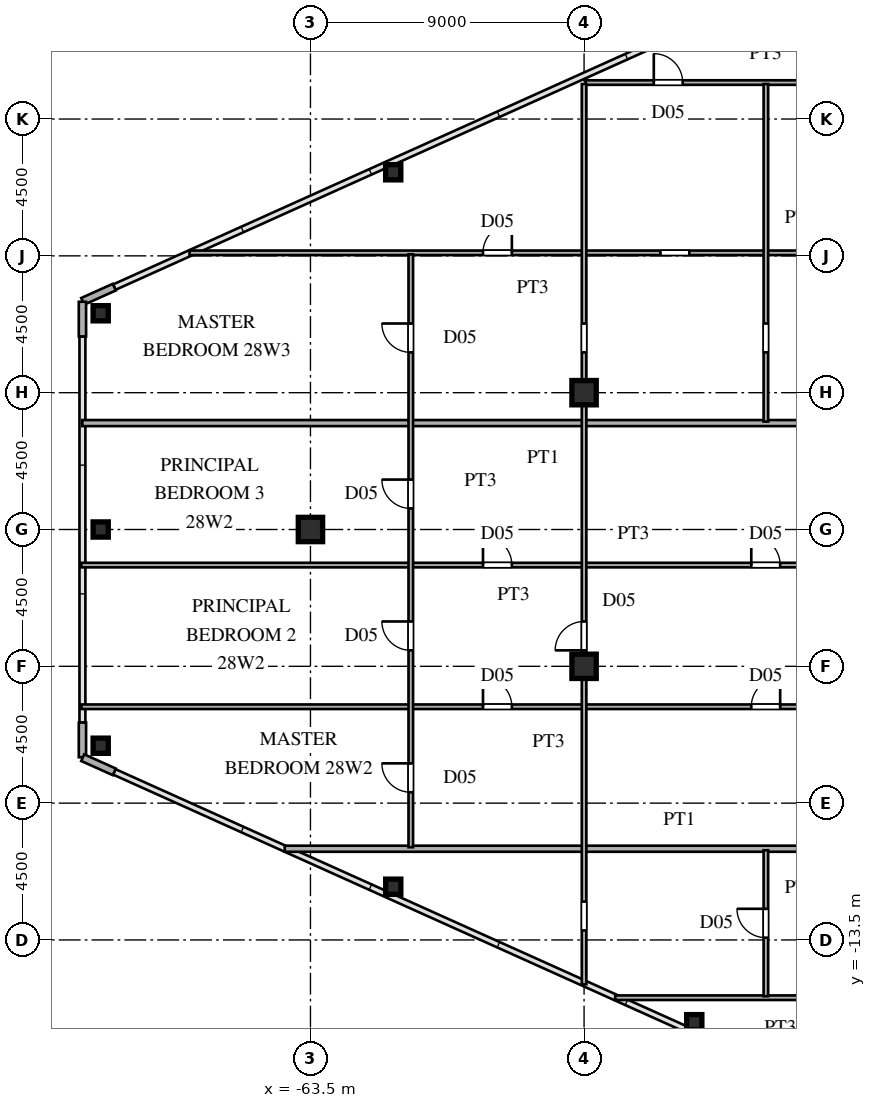
"""IFC4 building model, lengths in metres.
Left out: names, types, materials, properties, quantities, classifications, styles, units other than length and angle.
Written with IfcOpenShell. Run it as: python <this file> out.ifc"""

import sys

from ifc_helpers import new_model, si_unit, direction, frame, frame_2d, origin, origin_2d, place, context, subcontext, project, spatial, rectangle, hollow_rectangle, i_section, extrude, source, transform, mapped, element, fill, save


model = new_model("IFC4")
c1 = context("Model", 3, precision=1e-05, world=origin(), true_north=direction((0.0, 1.0)))
c2 = subcontext(c1, "Body", "Model", "MODEL_VIEW")
j1 = project(units=[si_unit("LENGTHUNIT", "METRE"), si_unit("PLANEANGLEUNIT", "RADIAN")], contexts=[c1])
p1 = place(None, origin())
s1 = spatial("IfcSite", under=j1, at=p1, CompositionType="ELEMENT")
p2 = place(p1, origin())
s2 = spatial("IfcBuilding", under=s1, at=p2, CompositionType="ELEMENT")
p3 = place(p2, frame((0.0, 0.0, 106.8)))
s3 = spatial("IfcBuildingStorey", under=s2, at=p3, CompositionType="ELEMENT", Elevation=106.8)
m1 = source(origin(), c2, "Body", "SweptSolid", [
    extrude(i_section(OverallWidth=0.8, OverallDepth=0.8, WebThickness=0.032, FlangeThickness=0.05, at=origin_2d()), origin(), (0.0, 0.0, 1.0), 3.6),
])
for number, where, z_axis, x_axis in (
    (1, (-54.5, -4.5, 0.0), (0.0, 0.0, 1.0), (1.0, 0.0, 0.0)),
    (2, (-54.5, 4.5, 0.0), (0.0, 0.0, 1.0), (1.0, 0.0, 0.0)),
    (3, (-63.5, 0.0, 0.0), (0.0, 0.0, 1.0), (1.0, 0.0, 0.0)),
):
    element("IfcColumn", number, at=place(p3, frame(where, z_axis=z_axis, x_axis=x_axis)), inside=s3, PredefinedType="COLUMN", context=c2, shape_type="MappedRepresentation", body=[
        mapped(m1, transform((0.0, 0.0, 0.0), scale=1.0)),
    ])
m2 = source(origin(), c2, "Body", "SweptSolid", [
    extrude(hollow_rectangle(XDim=0.5, YDim=0.5, WallThickness=0.02, at=origin_2d()), origin(), (0.0, 0.0, 1.0), 3.6),
])
for number, where, z_axis, x_axis in (
    (4, (-70.4, 7.112, 0.0), (0.0, 0.0, 1.0), (1.0, 0.0, 0.0)),
    (5, (-70.4, -7.112, 0.0), (0.0, 0.0, 1.0), (1.0, 0.0, 0.0)),
    (6, (-50.875, -16.205, 0.0), (0.0, 0.0, 1.0), (1.0, 0.0, 0.0)),
    (7, (-60.778, -11.749, 0.0), (0.0, 0.0, 1.0), (1.0, 0.0, 0.0)),
    (8, (-60.778, 11.749, 0.0), (0.0, 0.0, 1.0), (1.0, 0.0, 0.0)),
    (9, (-70.4, 0.0, 0.0), (0.0, 0.0, 1.0), (1.0, 0.0, 0.0)),
):
    element("IfcColumn", number, at=place(p3, frame(where, z_axis=z_axis, x_axis=x_axis)), inside=s3, PredefinedType="COLUMN", context=c2, shape_type="MappedRepresentation", body=[
        mapped(m2, transform((0.0, 0.0, 0.0), scale=1.0)),
    ])
for number, where, z_axis, x_axis in (
    (10, (-69.951, 7.972, 0.0), (0.0, 0.0, 1.0), (-0.912, -0.41, 0.0)),
    (11, (-71.0, 7.49, 0.0), (0.0, 0.0, 1.0), (0.0, -1.0, 0.0)),
    (12, (-71.0, -6.35, 0.0), (0.0, 0.0, 1.0), (0.0, -1.0, 0.0)),
    (13, (-70.991, -7.504, 0.0), (0.0, 0.0, 1.0), (0.912, -0.41, 0.0)),
):
    element("IfcWall", number, at=place(p3, frame(where, z_axis=z_axis, x_axis=x_axis)), inside=s3, PredefinedType="SOLIDWALL", context=c2, shape_type="SweptSolid", body=[
        extrude(rectangle(XDim=1.14, YDim=0.24, at=frame_2d((0.57, 0.0))), origin(), (0.0, 0.0, 1.0), 3.38),
    ])
p4 = place(p3, frame((-53.477, -15.4, 0.0), z_axis=(0.0, 0.0, 1.0), x_axis=(1.0, 0.0, 0.0)))
e14 = element("IfcWall", 14, at=p4, inside=s3, PredefinedType="PARTITIONING", context=c2, shape_type="SweptSolid", body=[
    extrude(rectangle(XDim=10.877, YDim=0.15, at=frame_2d((5.438, 0.0))), origin(), (0.0, 0.0, 1.0), 3.38),
])
p5 = place(p4, frame((7.465, 0.0, 0.0)))
e15 = element("IfcOpeningElement", 15, at=p5, cuts=e14, PredefinedType="OPENING", context=c2, shape_type="SweptSolid", body=[
    extrude(rectangle(XDim=0.95, YDim=2.15, at=frame_2d((0.475, 1.075))), frame((0.0, 0.085, 0.0), z_axis=(0.0, -1.0, 0.0), x_axis=(1.0, 0.0, 0.0)), (0.0, 0.0, 1.0), 0.17),
])
p6 = place(p3, frame((-64.346, -10.5, 0.0), z_axis=(0.0, 0.0, 1.0), x_axis=(1.0, 0.0, 0.0)))
e16 = element("IfcWall", 16, at=p6, inside=s3, PredefinedType="PARTITIONING", context=c2, shape_type="SweptSolid", body=[
    extrude(rectangle(XDim=25.966, YDim=0.2, at=frame_2d((12.983, 0.0))), origin(), (0.0, 0.0, 1.0), 3.38),
])
p7 = place(p3, frame((-71.035, -5.83, 0.0), z_axis=(0.0, 0.0, 1.0), x_axis=(1.0, 0.0, 0.0)))
e17 = element("IfcWall", 17, at=p7, inside=s3, PredefinedType="PARTITIONING", context=c2, shape_type="SweptSolid", body=[
    extrude(rectangle(XDim=28.435, YDim=0.15, at=frame_2d((14.217, 0.0))), origin(), (0.0, 0.0, 1.0), 3.38),
])
p8 = place(p7, frame((22.035, 0.0, 0.0)))
e18 = element("IfcOpeningElement", 18, at=p8, cuts=e17, PredefinedType="OPENING", context=c2, shape_type="SweptSolid", body=[
    extrude(rectangle(XDim=0.95, YDim=2.15, at=frame_2d((0.475, 1.075))), frame((0.0, 0.085, 0.0), z_axis=(0.0, -1.0, 0.0), x_axis=(1.0, 0.0, 0.0)), (0.0, 0.0, 1.0), 0.17),
])
p9 = place(p7, frame((13.21, 0.0, 0.0)))
e19 = element("IfcOpeningElement", 19, at=p9, cuts=e17, PredefinedType="OPENING", context=c2, shape_type="SweptSolid", body=[
    extrude(rectangle(XDim=0.95, YDim=2.15, at=frame_2d((0.475, 1.075))), frame((0.0, 0.085, 0.0), z_axis=(0.0, -1.0, 0.0), x_axis=(1.0, 0.0, 0.0)), (0.0, 0.0, 1.0), 0.17),
])
p10 = place(p3, frame((-71.035, -1.17, 0.0), z_axis=(0.0, 0.0, 1.0), x_axis=(1.0, 0.0, 0.0)))
e20 = element("IfcWall", 20, at=p10, inside=s3, PredefinedType="PARTITIONING", context=c2, shape_type="SweptSolid", body=[
    extrude(rectangle(XDim=28.435, YDim=0.15, at=frame_2d((14.217, 0.0))), origin(), (0.0, 0.0, 1.0), 3.38),
])
p11 = place(p10, frame((22.035, 0.0, 0.0)))
e21 = element("IfcOpeningElement", 21, at=p11, cuts=e20, PredefinedType="OPENING", context=c2, shape_type="SweptSolid", body=[
    extrude(rectangle(XDim=0.95, YDim=2.15, at=frame_2d((0.475, 1.075))), frame((0.0, 0.085, 0.0), z_axis=(0.0, -1.0, 0.0), x_axis=(1.0, 0.0, 0.0)), (0.0, 0.0, 1.0), 0.17),
])
p12 = place(p10, frame((13.21, 0.0, 0.0)))
e22 = element("IfcOpeningElement", 22, at=p12, cuts=e20, PredefinedType="OPENING", context=c2, shape_type="SweptSolid", body=[
    extrude(rectangle(XDim=0.95, YDim=2.15, at=frame_2d((0.475, 1.075))), frame((0.0, 0.085, 0.0), z_axis=(0.0, -1.0, 0.0), x_axis=(1.0, 0.0, 0.0)), (0.0, 0.0, 1.0), 0.17),
])
p13 = place(p3, frame((-71.005, 3.5, 0.0), z_axis=(0.0, 0.0, 1.0), x_axis=(1.0, 0.0, 0.0)))
e23 = element("IfcWall", 23, at=p13, inside=s3, PredefinedType="PARTITIONING", context=c2, shape_type="SweptSolid", body=[
    extrude(rectangle(XDim=32.625, YDim=0.2, at=frame_2d((16.312, 0.0))), origin(), (0.0, 0.0, 1.0), 3.38),
])
p14 = place(p3, frame((-67.478, 9.1, 0.0), z_axis=(0.0, 0.0, 1.0), x_axis=(1.0, 0.0, 0.0)))
e24 = element("IfcWall", 24, at=p14, inside=s3, PredefinedType="PARTITIONING", context=c2, shape_type="SweptSolid", body=[
    extrude(rectangle(XDim=24.878, YDim=0.15, at=frame_2d((12.439, 0.0))), origin(), (0.0, 0.0, 1.0), 3.38),
])
p15 = place(p14, frame((21.466, 0.0, 0.0)))
e25 = element("IfcOpeningElement", 25, at=p15, cuts=e24, PredefinedType="OPENING", context=c2, shape_type="SweptSolid", body=[
    extrude(rectangle(XDim=0.95, YDim=2.15, at=frame_2d((0.475, 1.075))), frame((0.0, 0.085, 0.0), z_axis=(0.0, -1.0, 0.0), x_axis=(1.0, 0.0, 0.0)), (0.0, 0.0, 1.0), 0.17),
])
p16 = place(p14, frame((9.653, 0.0, 0.0)))
e26 = element("IfcOpeningElement", 26, at=p16, cuts=e24, PredefinedType="OPENING", context=c2, shape_type="SweptSolid", body=[
    extrude(rectangle(XDim=0.95, YDim=2.15, at=frame_2d((0.475, 1.075))), frame((0.0, 0.085, 0.0), z_axis=(0.0, -1.0, 0.0), x_axis=(1.0, 0.0, 0.0)), (0.0, 0.0, 1.0), 0.17),
])
p17 = place(p14, frame((15.49, 0.0, 0.0)))
e27 = element("IfcOpeningElement", 27, at=p17, cuts=e24, PredefinedType="OPENING", context=c2, shape_type="SweptSolid", body=[
    extrude(rectangle(XDim=0.95, YDim=2.15, at=frame_2d((0.475, 1.075))), frame((0.0, 0.085, 0.0), z_axis=(0.0, -1.0, 0.0), x_axis=(1.0, 0.0, 0.0)), (0.0, 0.0, 1.0), 0.17),
])
p18 = place(p3, frame((-54.45, 14.7, 0.0), z_axis=(0.0, 0.0, 1.0), x_axis=(1.0, 0.0, 0.0)))
e28 = element("IfcWall", 28, at=p18, inside=s3, PredefinedType="PARTITIONING", context=c2, shape_type="SweptSolid", body=[
    extrude(rectangle(XDim=11.85, YDim=0.15, at=frame_2d((5.925, 0.0))), origin(), (0.0, 0.0, 1.0), 3.38),
])
p19 = place(p18, frame((2.244, 0.0, 0.0)))
e29 = element("IfcOpeningElement", 29, at=p19, cuts=e28, PredefinedType="OPENING", context=c2, shape_type="SweptSolid", body=[
    extrude(rectangle(XDim=0.95, YDim=2.15, at=frame_2d((0.475, 1.075))), frame((0.0, 0.085, 0.0), z_axis=(0.0, -1.0, 0.0), x_axis=(1.0, 0.0, 0.0)), (0.0, 0.0, 1.0), 0.17),
])
p20 = place(p3, frame((-60.2, -10.45, 0.0), z_axis=(0.0, 0.0, 1.0), x_axis=(0.0, 1.0, 0.0)))
e30 = element("IfcWall", 30, at=p20, inside=s3, PredefinedType="PARTITIONING", context=c2, shape_type="SweptSolid", body=[
    extrude(rectangle(XDim=19.501, YDim=0.15, at=frame_2d((9.75, 0.0))), origin(), (0.0, 0.0, 1.0), 3.38),
])
p21 = place(p20, frame((1.808, 0.0, 0.0)))
e31 = element("IfcOpeningElement", 31, at=p21, cuts=e30, PredefinedType="OPENING", context=c2, shape_type="SweptSolid", body=[
    extrude(rectangle(XDim=0.95, YDim=2.15, at=frame_2d((0.475, 1.075))), frame((0.0, 0.085, 0.0), z_axis=(0.0, -1.0, 0.0), x_axis=(1.0, 0.0, 0.0)), (0.0, 0.0, 1.0), 0.17),
])
p22 = place(p20, frame((6.475, 0.0, 0.0)))
e32 = element("IfcOpeningElement", 32, at=p22, cuts=e30, PredefinedType="OPENING", context=c2, shape_type="SweptSolid", body=[
    extrude(rectangle(XDim=0.95, YDim=2.15, at=frame_2d((0.475, 1.075))), frame((0.0, 0.085, 0.0), z_axis=(0.0, -1.0, 0.0), x_axis=(1.0, 0.0, 0.0)), (0.0, 0.0, 1.0), 0.17),
])
p23 = place(p20, frame((11.142, 0.0, 0.0)))
e33 = element("IfcOpeningElement", 33, at=p23, cuts=e30, PredefinedType="OPENING", context=c2, shape_type="SweptSolid", body=[
    extrude(rectangle(XDim=0.95, YDim=2.15, at=frame_2d((0.475, 1.075))), frame((0.0, 0.085, 0.0), z_axis=(0.0, -1.0, 0.0), x_axis=(1.0, 0.0, 0.0)), (0.0, 0.0, 1.0), 0.17),
])
p24 = place(p20, frame((16.275, 0.0, 0.0)))
e34 = element("IfcOpeningElement", 34, at=p24, cuts=e30, PredefinedType="OPENING", context=c2, shape_type="SweptSolid", body=[
    extrude(rectangle(XDim=0.95, YDim=2.15, at=frame_2d((0.475, 1.075))), frame((0.0, 0.085, 0.0), z_axis=(0.0, -1.0, 0.0), x_axis=(1.0, 0.0, 0.0)), (0.0, 0.0, 1.0), 0.17),
])
p25 = place(p3, frame((-54.5, -14.96, 0.0), z_axis=(0.0, 0.0, 1.0), x_axis=(0.0, 1.0, 0.0)))
e35 = element("IfcWall", 35, at=p25, inside=s3, PredefinedType="PARTITIONING", context=c2, shape_type="SweptSolid", body=[
    extrude(rectangle(XDim=29.612, YDim=0.15, at=frame_2d((14.806, 0.0))), origin(), (0.0, 0.0, 1.0), 2.78),
])
p26 = place(p25, frame((1.772, 0.0, 0.0)))
e36 = element("IfcOpeningElement", 36, at=p26, cuts=e35, PredefinedType="OPENING", context=c2, shape_type="SweptSolid", body=[
    extrude(rectangle(XDim=0.95, YDim=2.15, at=frame_2d((0.475, 1.075))), frame((0.0, 0.085, 0.0), z_axis=(0.0, -1.0, 0.0), x_axis=(1.0, 0.0, 0.0)), (0.0, 0.0, 1.0), 0.17),
])
p27 = place(p25, frame((10.985, 0.0, 0.0)))
e37 = element("IfcOpeningElement", 37, at=p27, cuts=e35, PredefinedType="OPENING", context=c2, shape_type="SweptSolid", body=[
    extrude(rectangle(XDim=0.95, YDim=2.15, at=frame_2d((0.475, 1.075))), frame((0.0, 0.085, 0.0), z_axis=(0.0, -1.0, 0.0), x_axis=(1.0, 0.0, 0.0)), (0.0, 0.0, 1.0), 0.17),
])
p28 = place(p25, frame((20.785, 0.0, 0.0)))
e38 = element("IfcOpeningElement", 38, at=p28, cuts=e35, PredefinedType="OPENING", context=c2, shape_type="SweptSolid", body=[
    extrude(rectangle(XDim=0.95, YDim=2.15, at=frame_2d((0.475, 1.075))), frame((0.0, 0.085, 0.0), z_axis=(0.0, -1.0, 0.0), x_axis=(1.0, 0.0, 0.0)), (0.0, 0.0, 1.0), 0.17),
])
p29 = place(p3, frame((-48.52, -15.351, 0.0), z_axis=(0.0, 0.0, 1.0), x_axis=(0.0, 1.0, 0.0)))
e39 = element("IfcWall", 39, at=p29, inside=s3, PredefinedType="PARTITIONING", context=c2, shape_type="SweptSolid", body=[
    extrude(rectangle(XDim=4.801, YDim=0.15, at=frame_2d((2.4, 0.0))), origin(), (0.0, 0.0, 1.0), 3.38),
])
p30 = place(p29, frame((1.925, 0.0, 0.0)))
e40 = element("IfcOpeningElement", 40, at=p30, cuts=e39, PredefinedType="OPENING", context=c2, shape_type="SweptSolid", body=[
    extrude(rectangle(XDim=0.95, YDim=2.15, at=frame_2d((0.475, 1.075))), frame((0.0, 0.085, 0.0), z_axis=(0.0, -1.0, 0.0), x_axis=(1.0, 0.0, 0.0)), (0.0, 0.0, 1.0), 0.17),
])
p31 = place(p3, frame((-48.52, 3.55, 0.0), z_axis=(0.0, 0.0, 1.0), x_axis=(0.0, 1.0, 0.0)))
e41 = element("IfcWall", 41, at=p31, inside=s3, PredefinedType="PARTITIONING", context=c2, shape_type="SweptSolid", body=[
    extrude(rectangle(XDim=11.102, YDim=0.15, at=frame_2d((5.551, 0.0))), origin(), (0.0, 0.0, 1.0), 3.38),
])
p32 = place(p31, frame((2.275, 0.0, 0.0)))
e42 = element("IfcOpeningElement", 42, at=p32, cuts=e41, PredefinedType="OPENING", context=c2, shape_type="SweptSolid", body=[
    extrude(rectangle(XDim=0.95, YDim=2.15, at=frame_2d((0.475, 1.075))), frame((0.0, 0.085, 0.0), z_axis=(0.0, -1.0, 0.0), x_axis=(1.0, 0.0, 0.0)), (0.0, 0.0, 1.0), 0.17),
])
m3 = source(origin(), c2, "Body", "SweptSolid", [
    extrude(rectangle(XDim=0.95, YDim=2.15, at=frame_2d((0.475, 1.075))), frame((0.0, 0.025, 0.0), z_axis=(0.0, -1.0, 0.0), x_axis=(1.0, 0.0, 0.0)), (0.0, 0.0, 1.0), 0.05),
])
p33 = place(p8, origin())
e43 = element("IfcDoor", 43, at=p33, inside=s3, OperationType="SINGLE_SWING_RIGHT", PredefinedType="DOOR", context=c2, shape_type="MappedRepresentation", body=[
    mapped(m3, transform((0.0, 0.0, 0.0), scale=1.0)),
])
fill(e18, e43)
p34 = place(p9, origin())
e44 = element("IfcDoor", 44, at=p34, inside=s3, OperationType="SINGLE_SWING_LEFT", PredefinedType="DOOR", context=c2, shape_type="MappedRepresentation", body=[
    mapped(m3, transform((0.0, 0.0, 0.0), scale=1.0)),
])
fill(e19, e44)
p35 = place(p11, origin())
e45 = element("IfcDoor", 45, at=p35, inside=s3, OperationType="SINGLE_SWING_LEFT", PredefinedType="DOOR", context=c2, shape_type="MappedRepresentation", body=[
    mapped(m3, transform((0.0, 0.0, 0.0), scale=1.0)),
])
fill(e21, e45)
p36 = place(p12, origin())
e46 = element("IfcDoor", 46, at=p36, inside=s3, OperationType="SINGLE_SWING_LEFT", PredefinedType="DOOR", context=c2, shape_type="MappedRepresentation", body=[
    mapped(m3, transform((0.0, 0.0, 0.0), scale=1.0)),
])
fill(e22, e46)
p37 = place(p16, origin())
e47 = element("IfcDoor", 47, at=p37, inside=s3, OperationType="SINGLE_SWING_RIGHT", PredefinedType="DOOR", context=c2, shape_type="MappedRepresentation", body=[
    mapped(m3, transform((0.0, 0.0, 0.0), scale=1.0)),
])
fill(e26, e47)
p38 = place(p19, origin())
e48 = element("IfcDoor", 48, at=p38, inside=s3, OperationType="SINGLE_SWING_LEFT", PredefinedType="DOOR", context=c2, shape_type="MappedRepresentation", body=[
    mapped(m3, transform((0.0, 0.0, 0.0), scale=1.0)),
])
fill(e29, e48)
p39 = place(p21, origin())
e49 = element("IfcDoor", 49, at=p39, inside=s3, OperationType="SINGLE_SWING_RIGHT", PredefinedType="DOOR", context=c2, shape_type="MappedRepresentation", body=[
    mapped(m3, transform((0.0, 0.0, 0.0), scale=1.0)),
])
fill(e31, e49)
p40 = place(p22, origin())
e50 = element("IfcDoor", 50, at=p40, inside=s3, OperationType="SINGLE_SWING_RIGHT", PredefinedType="DOOR", context=c2, shape_type="MappedRepresentation", body=[
    mapped(m3, transform((0.0, 0.0, 0.0), scale=1.0)),
])
fill(e32, e50)
p41 = place(p23, origin())
e51 = element("IfcDoor", 51, at=p41, inside=s3, OperationType="SINGLE_SWING_RIGHT", PredefinedType="DOOR", context=c2, shape_type="MappedRepresentation", body=[
    mapped(m3, transform((0.0, 0.0, 0.0), scale=1.0)),
])
fill(e33, e51)
p42 = place(p24, origin())
e52 = element("IfcDoor", 52, at=p42, inside=s3, OperationType="SINGLE_SWING_RIGHT", PredefinedType="DOOR", context=c2, shape_type="MappedRepresentation", body=[
    mapped(m3, transform((0.0, 0.0, 0.0), scale=1.0)),
])
fill(e34, e52)
p43 = place(p27, origin())
e53 = element("IfcDoor", 53, at=p43, inside=s3, OperationType="SINGLE_SWING_LEFT", PredefinedType="DOOR", context=c2, shape_type="MappedRepresentation", body=[
    mapped(m3, transform((0.0, 0.0, 0.0), scale=1.0)),
])
fill(e37, e53)
p44 = place(p30, origin())
e54 = element("IfcDoor", 54, at=p44, inside=s3, OperationType="SINGLE_SWING_RIGHT", PredefinedType="DOOR", context=c2, shape_type="MappedRepresentation", body=[
    mapped(m3, transform((0.0, 0.0, 0.0), scale=1.0)),
])
fill(e40, e54)
save(model, sys.argv[1])
